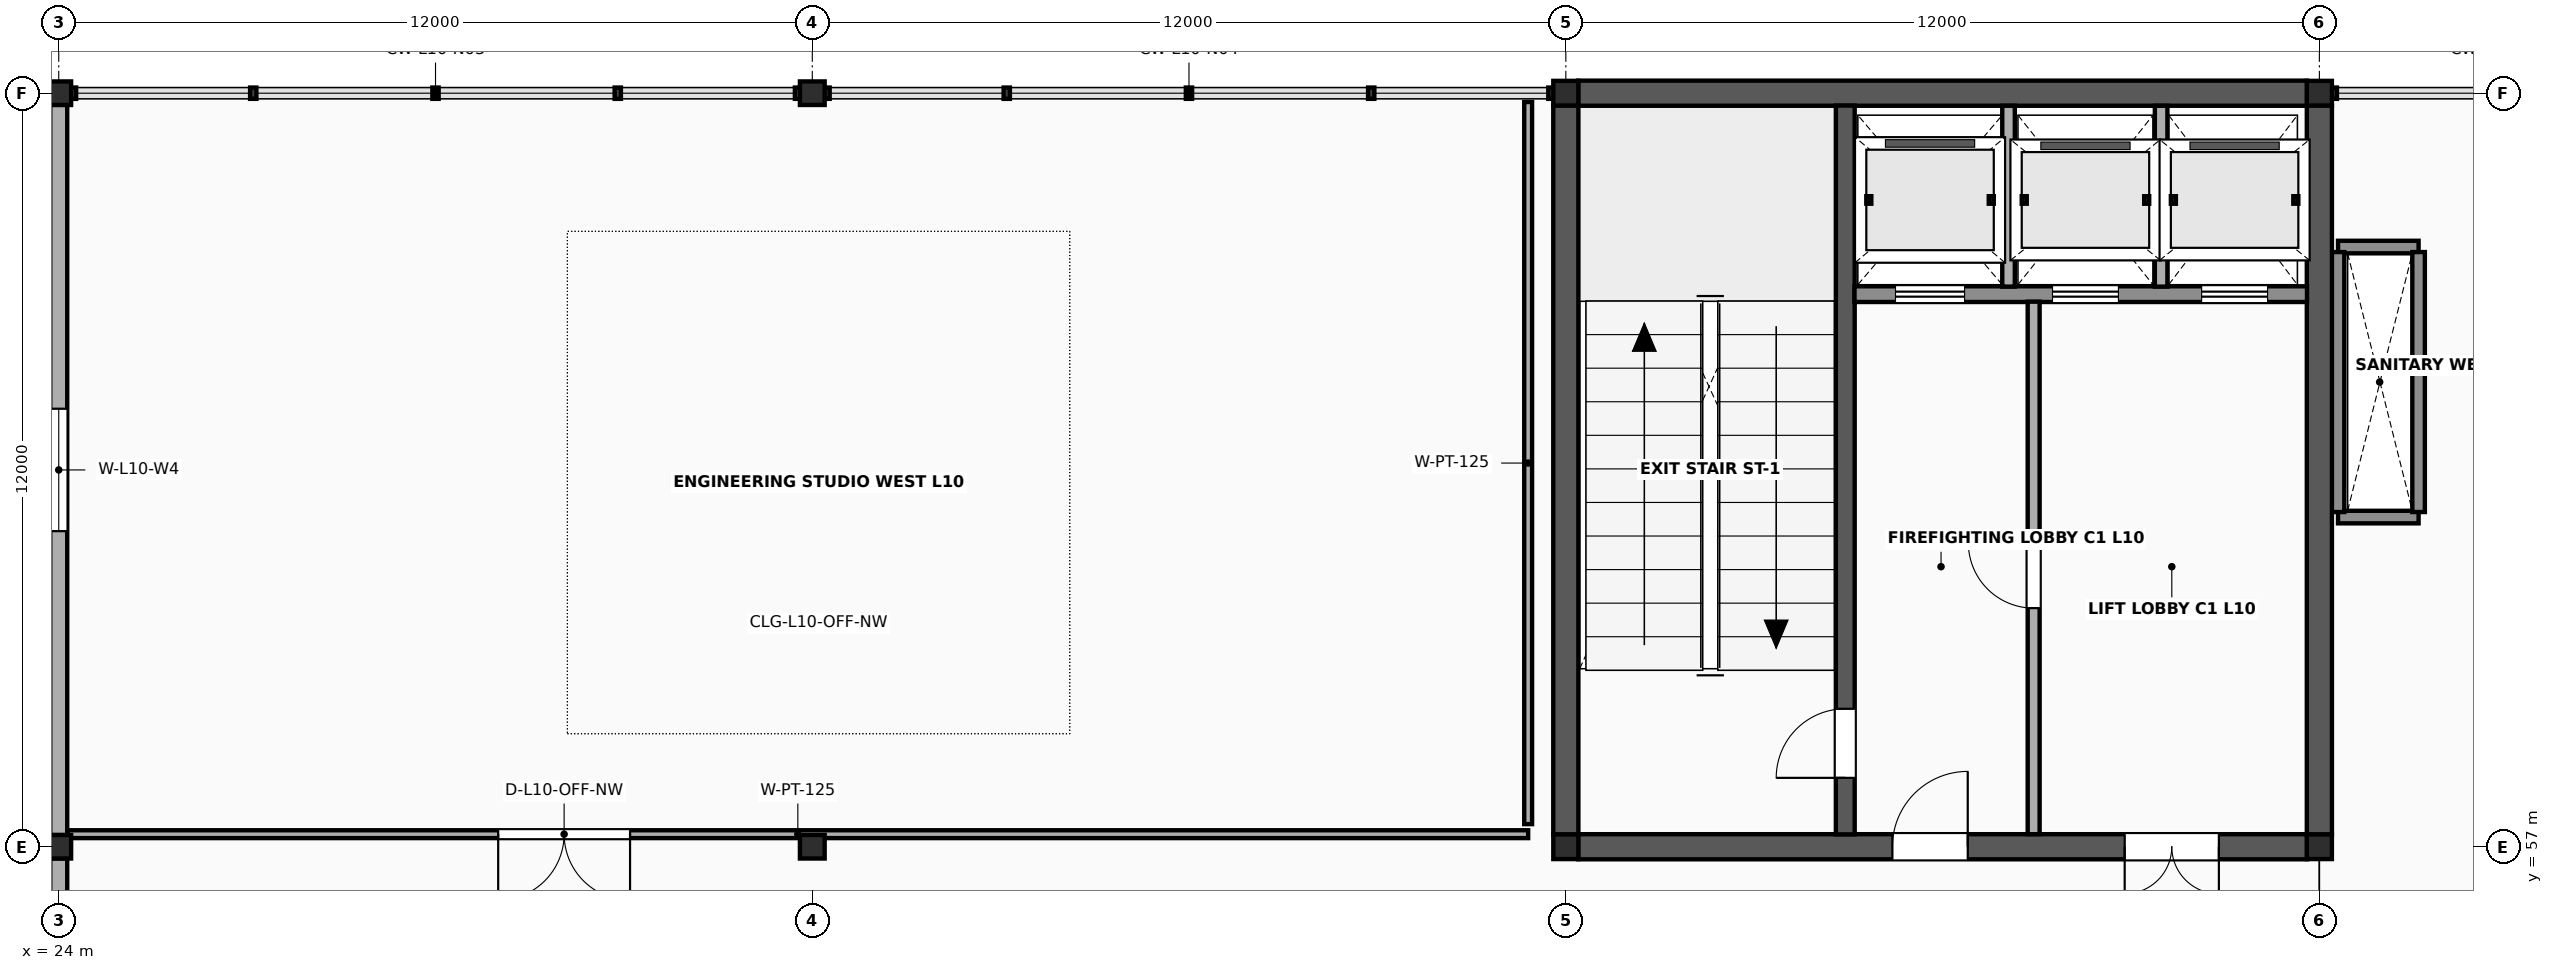
"""IFC4 building model, lengths in metres.
Left out: names, types, materials, properties, quantities, classifications, styles, units other than length and angle.
Written with IfcOpenShell. Run it as: python <this file> out.ifc"""

import sys

from ifc_helpers import new_model, si_unit, direction, frame, frame_2d, origin, origin_2d, place, context, subcontext, project, spatial, rectangle, i_section, extrude, element, fill, save


model = new_model("IFC4")
c1 = context("Model", 3, precision=1e-05, world=origin(), true_north=direction((0.0, 1.0)))
c2 = subcontext(c1, "Body", "Model", "MODEL_VIEW")
j1 = project(units=[si_unit("LENGTHUNIT", "METRE"), si_unit("PLANEANGLEUNIT", "RADIAN")], contexts=[c1])
p1 = place(None, origin())
s1 = spatial("IfcSite", under=j1, at=p1, CompositionType="ELEMENT")
p2 = place(p1, origin())
s2 = spatial("IfcBuilding", under=s1, at=p2, CompositionType="ELEMENT")
p3 = place(p2, frame((0.0, 0.0, 41.6)))
s3 = spatial("IfcBuildingStorey", under=s2, at=p3, CompositionType="ELEMENT", Elevation=41.6)
for number, where, z_axis, x_axis in (
    (1, (24.0, 57.0, 0.0), (0.0, 0.0, 1.0), (1.0, 0.0, 0.0)),
    (2, (24.0, 69.0, 0.0), (0.0, 0.0, 1.0), (1.0, 0.0, 0.0)),
    (3, (36.0, 57.0, 0.0), (0.0, 0.0, 1.0), (1.0, 0.0, 0.0)),
    (4, (36.0, 69.0, 0.0), (0.0, 0.0, 1.0), (1.0, 0.0, 0.0)),
):
    element("IfcColumn", number, at=place(p3, frame(where, z_axis=z_axis, x_axis=x_axis)), inside=s3, PredefinedType="COLUMN", context=c2, shape_type="SweptSolid", body=[
        extrude(i_section(OverallWidth=0.394, OverallDepth=0.375, WebThickness=0.017, FlangeThickness=0.028, FilletRadius=0.018, at=origin_2d()), origin(), (0.0, 0.0, 1.0), 4.0),
    ])
for number, where, z_axis, x_axis in (
    (5, (48.0, 57.0, 0.0), (0.0, 0.0, 1.0), (1.0, 0.0, 0.0)),
    (6, (48.0, 69.0, 0.0), (0.0, 0.0, 1.0), (1.0, 0.0, 0.0)),
    (7, (60.0, 57.0, 0.0), (0.0, 0.0, 1.0), (1.0, 0.0, 0.0)),
    (8, (60.0, 69.0, 0.0), (0.0, 0.0, 1.0), (1.0, 0.0, 0.0)),
):
    element("IfcColumn", number, at=place(p3, frame(where, z_axis=z_axis, x_axis=x_axis)), inside=s3, PredefinedType="COLUMN", context=c2, shape_type="SweptSolid", body=[
        extrude(i_section(OverallWidth=0.399, OverallDepth=0.393, WebThickness=0.023, FlangeThickness=0.037, FilletRadius=0.018, at=origin_2d()), origin(), (0.0, 0.0, 1.0), 4.0),
    ])
for number, where, z_axis, x_axis in (
    (9, (60.297, 62.25, 0.0), (0.0, 0.0, 1.0), (1.0, 0.0, 0.0)),
    (10, (60.297, 66.55, 0.0), (0.0, 0.0, 1.0), (1.0, 0.0, 0.0)),
):
    element("IfcWall", number, at=place(p3, frame(where, z_axis=z_axis, x_axis=x_axis)), inside=s3, PredefinedType="SOLIDWALL", context=c2, shape_type="SweptSolid", body=[
        extrude(rectangle(XDim=1.283, YDim=0.2, at=frame_2d((0.642, 0.0))), origin(), (0.0, 0.0, 1.0), 3.828),
    ])
for number, where, z_axis, x_axis in (
    (11, (60.297, 62.33, 0.0), (0.0, 0.0, 1.0), (0.0, 1.0, 0.0)),
    (12, (61.58, 62.33, 0.0), (0.0, 0.0, 1.0), (0.0, 1.0, 0.0)),
):
    element("IfcWall", number, at=place(p3, frame(where, z_axis=z_axis, x_axis=x_axis)), inside=s3, PredefinedType="SOLIDWALL", context=c2, shape_type="SweptSolid", body=[
        extrude(rectangle(XDim=4.14, YDim=0.2, at=frame_2d((2.07, 0.0))), origin(), (0.0, 0.0, 1.0), 3.828),
    ])
p4 = place(p3, frame((48.197, 57.0, 0.0), z_axis=(0.0, 0.0, 1.0), x_axis=(1.0, 0.0, 0.0)))
e13 = element("IfcWall", 13, at=p4, inside=s3, PredefinedType="SHEAR", context=c2, shape_type="SweptSolid", body=[
    extrude(rectangle(XDim=11.607, YDim=0.4, at=frame_2d((5.803, 0.0))), origin(), (0.0, 0.0, 1.0), 3.828),
])
p5 = place(p4, frame((5.004, 0.0, 0.0)))
e14 = element("IfcOpeningElement", 14, at=p5, cuts=e13, PredefinedType="OPENING", context=c2, shape_type="SweptSolid", body=[
    extrude(rectangle(XDim=1.2, YDim=2.2, at=frame_2d((0.6, 1.1))), frame((0.0, 0.215, 0.0), z_axis=(0.0, -1.0, 0.0), x_axis=(1.0, 0.0, 0.0)), (0.0, 0.0, 1.0), 0.43),
])
p6 = place(p4, frame((8.703, 0.0, 0.0)))
e15 = element("IfcOpeningElement", 15, at=p6, cuts=e13, PredefinedType="OPENING", context=c2, shape_type="SweptSolid", body=[
    extrude(rectangle(XDim=1.5, YDim=2.25, at=frame_2d((0.75, 1.125))), frame((0.0, 0.215, 0.0), z_axis=(0.0, -1.0, 0.0), x_axis=(1.0, 0.0, 0.0)), (0.0, 0.0, 1.0), 0.43),
])
p7 = place(p3, frame((48.197, 69.0, 0.0), z_axis=(0.0, 0.0, 1.0), x_axis=(1.0, 0.0, 0.0)))
e16 = element("IfcWall", 16, at=p7, inside=s3, PredefinedType="SHEAR", context=c2, shape_type="SweptSolid", body=[
    extrude(rectangle(XDim=11.607, YDim=0.4, at=frame_2d((5.803, 0.0))), origin(), (0.0, 0.0, 1.0), 3.828),
])
for number, where, z_axis, x_axis in (
    (17, (48.0, 57.194, 0.0), (0.0, 0.0, 1.0), (0.0, 1.0, 0.0)),
    (18, (60.0, 57.194, 0.0), (0.0, 0.0, 1.0), (0.0, 1.0, 0.0)),
):
    element("IfcWall", number, at=place(p3, frame(where, z_axis=z_axis, x_axis=x_axis)), inside=s3, PredefinedType="SHEAR", context=c2, shape_type="SweptSolid", body=[
        extrude(rectangle(XDim=11.613, YDim=0.4, at=frame_2d((5.806, 0.0))), origin(), (0.0, 0.0, 1.0), 3.828),
    ])
p8 = place(p3, frame((52.45, 57.197, 0.0), z_axis=(0.0, 0.0, 1.0), x_axis=(0.0, 1.0, 0.0)))
e19 = element("IfcWall", 19, at=p8, inside=s3, PredefinedType="SHEAR", context=c2, shape_type="SweptSolid", body=[
    extrude(rectangle(XDim=11.606, YDim=0.3, at=frame_2d((5.803, 0.0))), origin(), (0.0, 0.0, 1.0), 3.828),
])
p9 = place(p8, frame((0.9, 0.0, 0.0)))
e20 = element("IfcOpeningElement", 20, at=p9, cuts=e19, PredefinedType="OPENING", context=c2, shape_type="SweptSolid", body=[
    extrude(rectangle(XDim=1.1, YDim=2.2, at=frame_2d((0.55, 1.1))), frame((0.0, 0.165, 0.0), z_axis=(0.0, -1.0, 0.0), x_axis=(1.0, 0.0, 0.0)), (0.0, 0.0, 1.0), 0.33),
])
p10 = place(p3, frame((52.597, 65.8, 0.0), z_axis=(0.0, 0.0, 1.0), x_axis=(1.0, 0.0, 0.0)))
e21 = element("IfcWall", 21, at=p10, inside=s3, PredefinedType="SOLIDWALL", context=c2, shape_type="SweptSolid", body=[
    extrude(rectangle(XDim=7.206, YDim=0.25, at=frame_2d((3.603, 0.0))), origin(), (0.0, 0.0, 1.0), 3.828),
])
p11 = place(p10, frame((0.653, 0.0, 0.0)))
e22 = element("IfcOpeningElement", 22, at=p11, cuts=e21, PredefinedType="OPENING", context=c2, shape_type="SweptSolid", body=[
    extrude(rectangle(XDim=1.1, YDim=2.24, at=frame_2d((0.55, 1.12))), frame((0.0, 0.14, 0.0), z_axis=(0.0, -1.0, 0.0), x_axis=(1.0, 0.0, 0.0)), (0.0, 0.0, 1.0), 0.28),
])
p12 = place(p10, frame((3.153, 0.0, 0.0)))
e23 = element("IfcOpeningElement", 23, at=p12, cuts=e21, PredefinedType="OPENING", context=c2, shape_type="SweptSolid", body=[
    extrude(rectangle(XDim=1.05, YDim=2.2, at=frame_2d((0.525, 1.1))), frame((0.0, 0.14, 0.0), z_axis=(0.0, -1.0, 0.0), x_axis=(1.0, 0.0, 0.0)), (0.0, 0.0, 1.0), 0.28),
])
p13 = place(p10, frame((5.528, 0.0, 0.0)))
e24 = element("IfcOpeningElement", 24, at=p13, cuts=e21, PredefinedType="OPENING", context=c2, shape_type="SweptSolid", body=[
    extrude(rectangle(XDim=1.05, YDim=2.2, at=frame_2d((0.525, 1.1))), frame((0.0, 0.14, 0.0), z_axis=(0.0, -1.0, 0.0), x_axis=(1.0, 0.0, 0.0)), (0.0, 0.0, 1.0), 0.28),
])
for number, where, z_axis, x_axis in (
    (25, (55.05, 65.92, 0.0), (0.0, 0.0, 1.0), (0.0, 1.0, 0.0)),
    (26, (57.48, 65.92, 0.0), (0.0, 0.0, 1.0), (0.0, 1.0, 0.0)),
):
    element("IfcWall", number, at=place(p3, frame(where, z_axis=z_axis, x_axis=x_axis)), inside=s3, PredefinedType="SOLIDWALL", context=c2, shape_type="SweptSolid", body=[
        extrude(rectangle(XDim=2.88, YDim=0.2, at=frame_2d((1.44, 0.0))), origin(), (0.0, 0.0, 1.0), 3.818),
    ])
p14 = place(p3, frame((55.45, 57.2, 0.0), z_axis=(0.0, 0.0, 1.0), x_axis=(0.0, 1.0, 0.0)))
e27 = element("IfcWall", 27, at=p14, inside=s3, PredefinedType="SOLIDWALL", context=c2, shape_type="SweptSolid", body=[
    extrude(rectangle(XDim=8.48, YDim=0.19, at=frame_2d((4.24, 0.0))), origin(), (0.0, 0.0, 1.0), 3.818),
])
p15 = place(p14, frame((3.6, 0.0, 0.0)))
e28 = element("IfcOpeningElement", 28, at=p15, cuts=e27, PredefinedType="OPENING", context=c2, shape_type="SweptSolid", body=[
    extrude(rectangle(XDim=1.04, YDim=2.18, at=frame_2d((0.52, 1.09))), frame((0.0, 0.11, 0.0), z_axis=(0.0, -1.0, 0.0), x_axis=(1.0, 0.0, 0.0)), (0.0, 0.0, 1.0), 0.22),
])
p16 = place(p3, frame((24.0, 45.186, 0.0), z_axis=(0.0, 0.0, 1.0), x_axis=(0.0, 1.0, 0.0)))
e29 = element("IfcWall", 29, at=p16, inside=s3, PredefinedType="SOLIDWALL", context=c2, shape_type="SweptSolid", body=[
    extrude(rectangle(XDim=11.629, YDim=0.27, at=frame_2d((5.814, 0.0))), origin(), (0.0, 0.0, 1.0), 3.281),
])
p17 = place(p16, frame((4.564, 0.0, 0.78)))
e30 = element("IfcOpeningElement", 30, at=p17, cuts=e29, PredefinedType="OPENING", context=c2, shape_type="SweptSolid", body=[
    extrude(rectangle(XDim=2.5, YDim=1.9, at=frame_2d((1.25, 0.95))), frame((0.0, 0.15, 0.0), z_axis=(0.0, -1.0, 0.0), x_axis=(1.0, 0.0, 0.0)), (0.0, 0.0, 1.0), 0.3),
])
p18 = place(p3, frame((24.0, 57.186, 0.0), z_axis=(0.0, 0.0, 1.0), x_axis=(0.0, 1.0, 0.0)))
e31 = element("IfcWall", 31, at=p18, inside=s3, PredefinedType="SOLIDWALL", context=c2, shape_type="SweptSolid", body=[
    extrude(rectangle(XDim=11.629, YDim=0.27, at=frame_2d((5.814, 0.0))), origin(), (0.0, 0.0, 1.0), 3.281),
])
p19 = place(p18, frame((4.84, 0.0, 1.4)))
e32 = element("IfcOpeningElement", 32, at=p19, cuts=e31, PredefinedType="OPENING", context=c2, shape_type="SweptSolid", body=[
    extrude(rectangle(XDim=1.95, YDim=0.88, at=frame_2d((0.975, 0.44))), frame((0.0, 0.15, 0.0), z_axis=(0.0, -1.0, 0.0), x_axis=(1.0, 0.0, 0.0)), (0.0, 0.0, 1.0), 0.3),
])
p20 = place(p3, frame((24.14, 57.2, 0.0), z_axis=(0.0, 0.0, 1.0), x_axis=(1.0, 0.0, 0.0)))
e33 = element("IfcWall", 33, at=p20, inside=s3, PredefinedType="PARTITIONING", context=c2, shape_type="SweptSolid", body=[
    extrude(rectangle(XDim=23.26, YDim=0.125, at=frame_2d((11.63, 0.0))), origin(), (0.0, 0.0, 1.0), 2.88),
])
p21 = place(p20, frame((6.858, 0.0, 0.0)))
e34 = element("IfcOpeningElement", 34, at=p21, cuts=e33, PredefinedType="OPENING", context=c2, shape_type="SweptSolid", body=[
    extrude(rectangle(XDim=2.1, YDim=2.47, at=frame_2d((1.05, 1.235))), frame((0.0, 0.077, 0.0), z_axis=(0.0, -1.0, 0.0), x_axis=(1.0, 0.0, 0.0)), (0.0, 0.0, 1.0), 0.155),
])
p22 = place(p3, frame((47.4, 57.36, 0.0), z_axis=(0.0, 0.0, 1.0), x_axis=(0.0, 1.0, 0.0)))
e35 = element("IfcWall", 35, at=p22, inside=s3, PredefinedType="PARTITIONING", context=c2, shape_type="SweptSolid", body=[
    extrude(rectangle(XDim=11.5, YDim=0.125, at=frame_2d((5.75, 0.0))), origin(), (0.0, 0.0, 1.0), 2.88),
])
p23 = place(p19, origin())
e36 = element("IfcWindow", 36, at=p23, inside=s3, PartitioningType="DOUBLE_PANEL_VERTICAL", PredefinedType="USERDEFINED", context=c2, shape_type="SweptSolid", body=[
    extrude(rectangle(XDim=1.95, YDim=0.88, at=frame_2d((0.975, 0.44))), frame((0.0, 0.03, 0.0), z_axis=(0.0, -1.0, 0.0), x_axis=(1.0, 0.0, 0.0)), (0.0, 0.0, 1.0), 0.06),
])
fill(e32, e36)
p24 = place(p9, origin())
e37 = element("IfcDoor", 37, at=p24, inside=s3, OperationType="SINGLE_SWING_LEFT", PredefinedType="DOOR", context=c2, shape_type="SweptSolid", body=[
    extrude(rectangle(XDim=1.1, YDim=2.2, at=frame_2d((0.55, 1.1))), frame((0.0, 0.025, 0.0), z_axis=(0.0, -1.0, 0.0), x_axis=(1.0, 0.0, 0.0)), (0.0, 0.0, 1.0), 0.05),
])
fill(e20, e37)
p25 = place(p15, origin())
e38 = element("IfcDoor", 38, at=p25, inside=s3, OperationType="SINGLE_SWING_RIGHT", PredefinedType="DOOR", context=c2, shape_type="SweptSolid", body=[
    extrude(rectangle(XDim=1.04, YDim=2.18, at=frame_2d((0.52, 1.09))), frame((0.0, 0.025, 0.0), z_axis=(0.0, -1.0, 0.0), x_axis=(1.0, 0.0, 0.0)), (0.0, 0.0, 1.0), 0.05),
])
fill(e28, e38)
p26 = place(p5, origin())
e39 = element("IfcDoor", 39, at=p26, inside=s3, OperationType="SINGLE_SWING_RIGHT", PredefinedType="DOOR", context=c2, shape_type="SweptSolid", body=[
    extrude(rectangle(XDim=1.2, YDim=2.2, at=frame_2d((0.6, 1.1))), frame((0.0, 0.025, 0.0), z_axis=(0.0, -1.0, 0.0), x_axis=(1.0, 0.0, 0.0)), (0.0, 0.0, 1.0), 0.05),
])
fill(e14, e39)
p27 = place(p6, origin())
e40 = element("IfcDoor", 40, at=p27, inside=s3, OperationType="DOUBLE_DOOR_SINGLE_SWING", PredefinedType="DOOR", context=c2, shape_type="SweptSolid", body=[
    extrude(rectangle(XDim=1.5, YDim=2.25, at=frame_2d((0.75, 1.125))), frame((0.0, 0.025, 0.0), z_axis=(0.0, -1.0, 0.0), x_axis=(1.0, 0.0, 0.0)), (0.0, 0.0, 1.0), 0.05),
])
fill(e15, e40)
p28 = place(p11, origin())
e41 = element("IfcDoor", 41, at=p28, inside=s3, OperationType="SLIDING_TO_LEFT", PredefinedType="USERDEFINED", context=c2, shape_type="SweptSolid", body=[
    extrude(rectangle(XDim=1.1, YDim=2.24, at=frame_2d((0.55, 1.12))), frame((0.0, 0.025, 0.0), z_axis=(0.0, -1.0, 0.0), x_axis=(1.0, 0.0, 0.0)), (0.0, 0.0, 1.0), 0.05),
])
fill(e22, e41)
p29 = place(p12, origin())
e42 = element("IfcDoor", 42, at=p29, inside=s3, OperationType="SLIDING_TO_LEFT", PredefinedType="USERDEFINED", context=c2, shape_type="SweptSolid", body=[
    extrude(rectangle(XDim=1.05, YDim=2.2, at=frame_2d((0.525, 1.1))), frame((0.0, 0.025, 0.0), z_axis=(0.0, -1.0, 0.0), x_axis=(1.0, 0.0, 0.0)), (0.0, 0.0, 1.0), 0.05),
])
fill(e23, e42)
p30 = place(p13, origin())
e43 = element("IfcDoor", 43, at=p30, inside=s3, OperationType="SLIDING_TO_LEFT", PredefinedType="USERDEFINED", context=c2, shape_type="SweptSolid", body=[
    extrude(rectangle(XDim=1.05, YDim=2.2, at=frame_2d((0.525, 1.1))), frame((0.0, 0.025, 0.0), z_axis=(0.0, -1.0, 0.0), x_axis=(1.0, 0.0, 0.0)), (0.0, 0.0, 1.0), 0.05),
])
fill(e24, e43)
p31 = place(p21, origin())
e44 = element("IfcDoor", 44, at=p31, inside=s3, OperationType="DOUBLE_DOOR_SINGLE_SWING", PredefinedType="DOOR", context=c2, shape_type="SweptSolid", body=[
    extrude(rectangle(XDim=2.1, YDim=2.47, at=frame_2d((1.05, 1.235))), frame((0.0, 0.025, 0.0), z_axis=(0.0, -1.0, 0.0), x_axis=(1.0, 0.0, 0.0)), (0.0, 0.0, 1.0), 0.05),
])
fill(e34, e44)
save(model, sys.argv[1])
